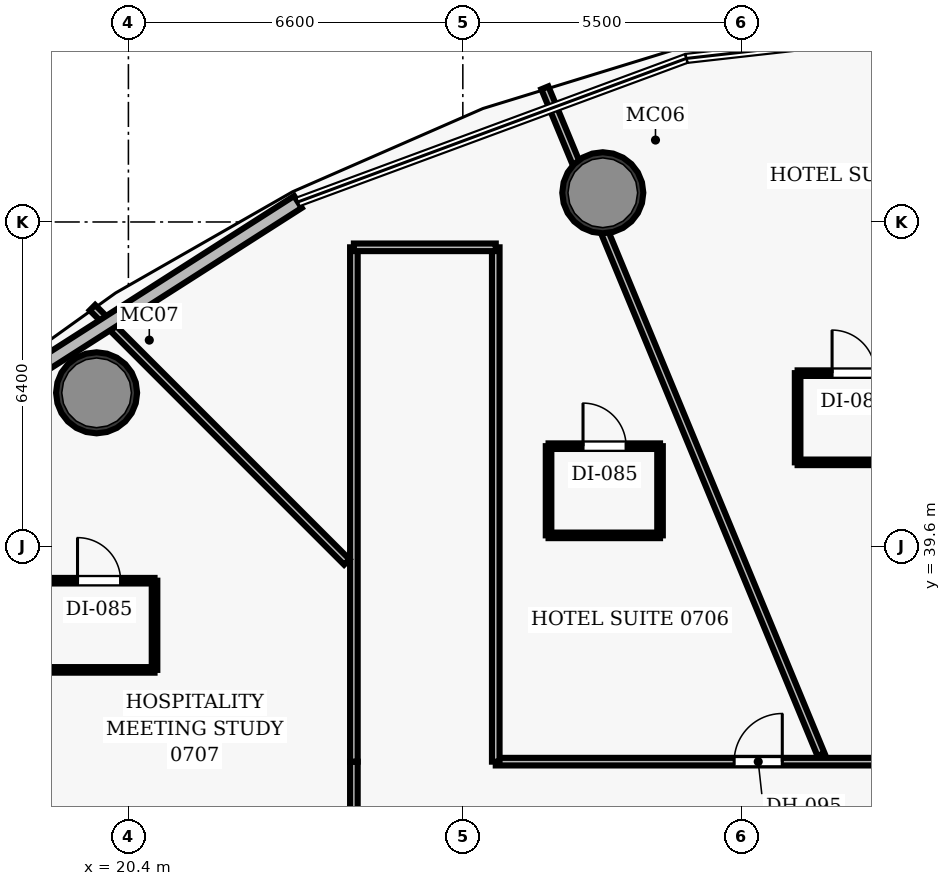
"""IFC4 building model, lengths in metres.
Left out: names, types, materials, properties, quantities, classifications, styles, units other than length and angle.
Written with IfcOpenShell. Run it as: python <this file> out.ifc"""

import sys

from ifc_helpers import new_model, si_unit, direction, frame, frame_2d, origin, origin_2d, place, context, subcontext, project, spatial, rectangle, hollow_circle, extrude, element, fill, save


model = new_model("IFC4")
c1 = context("Model", 3, precision=1e-05, world=origin(), true_north=direction((0.0, 1.0)))
c2 = subcontext(c1, "Body", "Model", "MODEL_VIEW")
j1 = project(units=[si_unit("LENGTHUNIT", "METRE"), si_unit("PLANEANGLEUNIT", "RADIAN")], contexts=[c1])
p1 = place(None, origin())
s1 = spatial("IfcSite", under=j1, at=p1, CompositionType="ELEMENT")
p2 = place(p1, origin())
s2 = spatial("IfcBuilding", under=s1, at=p2, CompositionType="ELEMENT")
p3 = place(p2, frame((0.0, 0.0, 41.4)))
s3 = spatial("IfcBuildingStorey", under=s2, at=p3, CompositionType="ELEMENT", Elevation=41.4)
for number, where, z_axis, x_axis in (
    (1, (29.762, 46.577, 0.0), (0.0, 0.0, 1.0), (1.0, 0.0, 0.0)),
    (2, (19.772, 42.629, 0.0), (0.0, 0.0, 1.0), (1.0, 0.0, 0.0)),
):
    element("IfcColumn", number, at=place(p3, frame(where, z_axis=z_axis, x_axis=x_axis)), inside=s3, PredefinedType="COLUMN", context=c2, shape_type="SweptSolid", body=[
        extrude(hollow_circle(Radius=0.8, WallThickness=0.06, at=origin_2d()), origin(), (0.0, 0.0, 1.0), 3.5),
    ])
p4 = place(p3, frame((27.65, 35.35, 0.0), z_axis=(0.0, 0.0, 1.0), x_axis=(1.0, 0.0, 0.0)))
e3 = element("IfcWall", 3, at=p4, inside=s3, PredefinedType="PARTITIONING", context=c2, shape_type="SweptSolid", body=[
    extrude(rectangle(XDim=23.5, YDim=0.15, at=frame_2d((11.75, 0.0))), origin(), (0.0, 0.0, 1.0), 2.6),
])
p5 = place(p4, frame((15.045, 0.0, 0.0)))
e4 = element("IfcOpeningElement", 4, at=p5, cuts=e3, PredefinedType="OPENING", context=c2, shape_type="SweptSolid", body=[
    extrude(rectangle(XDim=0.95, YDim=2.15, at=frame_2d((0.475, 1.075))), frame((0.0, 0.085, 0.0), z_axis=(0.0, -1.0, 0.0), x_axis=(1.0, 0.0, 0.0)), (0.0, 0.0, 1.0), 0.17),
])
p6 = place(p4, frame((11.159, 0.0, 0.0)))
e5 = element("IfcOpeningElement", 5, at=p6, cuts=e3, PredefinedType="OPENING", context=c2, shape_type="SweptSolid", body=[
    extrude(rectangle(XDim=0.95, YDim=2.15, at=frame_2d((0.475, 1.075))), frame((0.0, 0.085, 0.0), z_axis=(0.0, -1.0, 0.0), x_axis=(1.0, 0.0, 0.0)), (0.0, 0.0, 1.0), 0.17),
])
p7 = place(p4, frame((7.914, 0.0, 0.0)))
e6 = element("IfcOpeningElement", 6, at=p7, cuts=e3, PredefinedType="OPENING", context=c2, shape_type="SweptSolid", body=[
    extrude(rectangle(XDim=0.95, YDim=2.15, at=frame_2d((0.475, 1.075))), frame((0.0, 0.085, 0.0), z_axis=(0.0, -1.0, 0.0), x_axis=(1.0, 0.0, 0.0)), (0.0, 0.0, 1.0), 0.17),
])
p8 = place(p4, frame((4.705, 0.0, 0.0)))
e7 = element("IfcOpeningElement", 7, at=p8, cuts=e3, PredefinedType="OPENING", context=c2, shape_type="SweptSolid", body=[
    extrude(rectangle(XDim=0.95, YDim=2.15, at=frame_2d((0.475, 1.075))), frame((0.0, 0.085, 0.0), z_axis=(0.0, -1.0, 0.0), x_axis=(1.0, 0.0, 0.0)), (0.0, 0.0, 1.0), 0.17),
])
p9 = place(p3, frame((24.85, 19.45, 0.0), z_axis=(0.0, 0.0, 1.0), x_axis=(0.0, 1.0, 0.0)))
e8 = element("IfcWall", 8, at=p9, inside=s3, PredefinedType="PARTITIONING", context=c2, shape_type="SweptSolid", body=[
    extrude(rectangle(XDim=15.9, YDim=0.15, at=frame_2d((7.95, 0.0))), origin(), (0.0, 0.0, 1.0), 2.6),
])
p10 = place(p9, frame((12.728, 0.0, 0.0)))
e9 = element("IfcOpeningElement", 9, at=p10, cuts=e8, PredefinedType="OPENING", context=c2, shape_type="SweptSolid", body=[
    extrude(rectangle(XDim=0.95, YDim=2.15, at=frame_2d((0.475, 1.075))), frame((0.0, 0.085, 0.0), z_axis=(0.0, -1.0, 0.0), x_axis=(1.0, 0.0, 0.0)), (0.0, 0.0, 1.0), 0.17),
])
p11 = place(p9, frame((7.301, 0.0, 0.0)))
e10 = element("IfcOpeningElement", 10, at=p11, cuts=e8, PredefinedType="OPENING", context=c2, shape_type="SweptSolid", body=[
    extrude(rectangle(XDim=0.95, YDim=2.15, at=frame_2d((0.475, 1.075))), frame((0.0, 0.085, 0.0), z_axis=(0.0, -1.0, 0.0), x_axis=(1.0, 0.0, 0.0)), (0.0, 0.0, 1.0), 0.17),
])
p12 = place(p9, frame((4.849, 0.0, 0.0)))
e11 = element("IfcOpeningElement", 11, at=p12, cuts=e8, PredefinedType="OPENING", context=c2, shape_type="SweptSolid", body=[
    extrude(rectangle(XDim=0.95, YDim=2.15, at=frame_2d((0.475, 1.075))), frame((0.0, 0.085, 0.0), z_axis=(0.0, -1.0, 0.0), x_axis=(1.0, 0.0, 0.0)), (0.0, 0.0, 1.0), 0.17),
])
for number, where, z_axis, x_axis in (
    (12, (24.85, 35.35, 0.0), (0.0, 0.0, 1.0), (0.0, 1.0, 0.0)),
    (13, (27.65, 35.35, 0.0), (0.0, 0.0, 1.0), (0.0, 1.0, 0.0)),
):
    element("IfcWall", number, at=place(p3, frame(where, z_axis=z_axis, x_axis=x_axis)), inside=s3, PredefinedType="PARTITIONING", context=c2, shape_type="SweptSolid", body=[
        extrude(rectangle(XDim=10.15, YDim=0.15, at=frame_2d((5.075, 0.0))), origin(), (0.0, 0.0, 1.0), 2.6),
    ])
p13 = place(p3, frame((24.85, 45.5, 0.0), z_axis=(0.0, 0.0, 1.0), x_axis=(1.0, 0.0, 0.0)))
e14 = element("IfcWall", 14, at=p13, inside=s3, PredefinedType="PARTITIONING", context=c2, shape_type="SweptSolid", body=[
    extrude(rectangle(XDim=2.8, YDim=0.15, at=frame_2d((1.4, 0.0))), origin(), (0.0, 0.0, 1.0), 2.6),
])
p14 = place(p3, frame((34.069, 35.49, 0.0), z_axis=(0.0, 0.0, 1.0), x_axis=(-0.38268890868, 0.923877264128, 0.0)))
e15 = element("IfcWall", 15, at=p14, inside=s3, PredefinedType="PARTITIONING", context=c2, shape_type="SweptSolid", body=[
    extrude(rectangle(XDim=14.242, YDim=0.15, at=frame_2d((7.121, 0.0))), origin(), (0.0, 0.0, 1.0), 2.6),
])
p15 = place(p3, frame((24.71, 39.29, 0.0), z_axis=(0.0, 0.0, 1.0), x_axis=(-0.707106781187, 0.707106781187, 0.0)))
e16 = element("IfcWall", 16, at=p15, inside=s3, PredefinedType="PARTITIONING", context=c2, shape_type="SweptSolid", body=[
    extrude(rectangle(XDim=7.099, YDim=0.15, at=frame_2d((3.549, 0.0))), origin(), (0.0, 0.0, 1.0), 2.6),
])
p16 = place(p3, frame((24.71, 31.505, 0.0), z_axis=(0.0, 0.0, 1.0), x_axis=(-0.923878333013, 0.382686328197, 0.0)))
e17 = element("IfcWall", 17, at=p16, inside=s3, PredefinedType="PARTITIONING", context=c2, shape_type="SweptSolid", body=[
    extrude(rectangle(XDim=14.223, YDim=0.15, at=frame_2d((7.111, 0.0))), origin(), (0.0, 0.0, 1.0), 2.6),
])
p17 = place(p3, frame((33.607, 41.257, 0.0), z_axis=(0.0, 0.0, 1.0), x_axis=(1.0, 0.0, 0.0)))
e18 = element("IfcWall", 18, at=p17, inside=s3, PredefinedType="PARTITIONING", context=c2, shape_type="SweptSolid", body=[
    extrude(rectangle(XDim=2.2, YDim=0.11, at=frame_2d((1.1, 0.0))), origin(), (0.0, 0.0, 1.0), 2.6),
])
p18 = place(p3, frame((33.607, 43.017, 0.0), z_axis=(0.0, 0.0, 1.0), x_axis=(1.0, 0.0, 0.0)))
e19 = element("IfcWall", 19, at=p18, inside=s3, PredefinedType="PARTITIONING", context=c2, shape_type="SweptSolid", body=[
    extrude(rectangle(XDim=2.2, YDim=0.11, at=frame_2d((1.1, 0.0))), origin(), (0.0, 0.0, 1.0), 2.6),
])
p19 = place(p18, frame((0.68, 0.0, 0.0)))
e20 = element("IfcOpeningElement", 20, at=p19, cuts=e19, PredefinedType="OPENING", context=c2, shape_type="SweptSolid", body=[
    extrude(rectangle(XDim=0.85, YDim=2.1, at=frame_2d((0.425, 1.05))), frame((0.0, 0.065, 0.0), z_axis=(0.0, -1.0, 0.0), x_axis=(1.0, 0.0, 0.0)), (0.0, 0.0, 1.0), 0.13),
])
p20 = place(p3, frame((33.607, 41.257, 0.0), z_axis=(0.0, 0.0, 1.0), x_axis=(0.0, 1.0, 0.0)))
e21 = element("IfcWall", 21, at=p20, inside=s3, PredefinedType="PARTITIONING", context=c2, shape_type="SweptSolid", body=[
    extrude(rectangle(XDim=1.76, YDim=0.11, at=frame_2d((0.88, 0.0))), origin(), (0.0, 0.0, 1.0), 2.6),
])
p21 = place(p3, frame((28.692, 39.816, 0.0), z_axis=(0.0, 0.0, 1.0), x_axis=(1.0, 0.0, 0.0)))
e22 = element("IfcWall", 22, at=p21, inside=s3, PredefinedType="PARTITIONING", context=c2, shape_type="SweptSolid", body=[
    extrude(rectangle(XDim=2.2, YDim=0.11, at=frame_2d((1.1, 0.0))), origin(), (0.0, 0.0, 1.0), 2.6),
])
p22 = place(p3, frame((28.692, 41.576, 0.0), z_axis=(0.0, 0.0, 1.0), x_axis=(1.0, 0.0, 0.0)))
e23 = element("IfcWall", 23, at=p22, inside=s3, PredefinedType="PARTITIONING", context=c2, shape_type="SweptSolid", body=[
    extrude(rectangle(XDim=2.2, YDim=0.11, at=frame_2d((1.1, 0.0))), origin(), (0.0, 0.0, 1.0), 2.6),
])
p23 = place(p22, frame((0.68, 0.0, 0.0)))
e24 = element("IfcOpeningElement", 24, at=p23, cuts=e23, PredefinedType="OPENING", context=c2, shape_type="SweptSolid", body=[
    extrude(rectangle(XDim=0.85, YDim=2.1, at=frame_2d((0.425, 1.05))), frame((0.0, 0.065, 0.0), z_axis=(0.0, -1.0, 0.0), x_axis=(1.0, 0.0, 0.0)), (0.0, 0.0, 1.0), 0.13),
])
for number, where, z_axis, x_axis in (
    (25, (28.692, 39.816, 0.0), (0.0, 0.0, 1.0), (0.0, 1.0, 0.0)),
    (26, (30.892, 39.816, 0.0), (0.0, 0.0, 1.0), (0.0, 1.0, 0.0)),
):
    element("IfcWall", number, at=place(p3, frame(where, z_axis=z_axis, x_axis=x_axis)), inside=s3, PredefinedType="PARTITIONING", context=c2, shape_type="SweptSolid", body=[
        extrude(rectangle(XDim=1.76, YDim=0.11, at=frame_2d((0.88, 0.0))), origin(), (0.0, 0.0, 1.0), 2.6),
    ])
p24 = place(p3, frame((18.716, 37.161, 0.0), z_axis=(0.0, 0.0, 1.0), x_axis=(1.0, 0.0, 0.0)))
e27 = element("IfcWall", 27, at=p24, inside=s3, PredefinedType="PARTITIONING", context=c2, shape_type="SweptSolid", body=[
    extrude(rectangle(XDim=2.2, YDim=0.11, at=frame_2d((1.1, 0.0))), origin(), (0.0, 0.0, 1.0), 2.6),
])
p25 = place(p3, frame((18.716, 38.921, 0.0), z_axis=(0.0, 0.0, 1.0), x_axis=(1.0, 0.0, 0.0)))
e28 = element("IfcWall", 28, at=p25, inside=s3, PredefinedType="PARTITIONING", context=c2, shape_type="SweptSolid", body=[
    extrude(rectangle(XDim=2.2, YDim=0.11, at=frame_2d((1.1, 0.0))), origin(), (0.0, 0.0, 1.0), 2.6),
])
p26 = place(p25, frame((0.68, 0.0, 0.0)))
e29 = element("IfcOpeningElement", 29, at=p26, cuts=e28, PredefinedType="OPENING", context=c2, shape_type="SweptSolid", body=[
    extrude(rectangle(XDim=0.85, YDim=2.1, at=frame_2d((0.425, 1.05))), frame((0.0, 0.065, 0.0), z_axis=(0.0, -1.0, 0.0), x_axis=(1.0, 0.0, 0.0)), (0.0, 0.0, 1.0), 0.13),
])
p27 = place(p3, frame((20.916, 37.161, 0.0), z_axis=(0.0, 0.0, 1.0), x_axis=(0.0, 1.0, 0.0)))
e30 = element("IfcWall", 30, at=p27, inside=s3, PredefinedType="PARTITIONING", context=c2, shape_type="SweptSolid", body=[
    extrude(rectangle(XDim=1.76, YDim=0.11, at=frame_2d((0.88, 0.0))), origin(), (0.0, 0.0, 1.0), 2.6),
])
p28 = place(p3, frame((17.135, 42.173, 0.0), z_axis=(0.0, 0.0, 1.0), x_axis=(0.84275430181, 0.538298417962, 0.0)))
e31 = element("IfcWall", 31, at=p28, inside=s3, PredefinedType="SOLIDWALL", context=c2, shape_type="SweptSolid", body=[
    extrude(rectangle(XDim=7.845, YDim=0.28, at=frame_2d((3.922, 0.0))), origin(), (0.0, 0.0, 1.0), 3.25),
])
p29 = place(p19, origin())
e32 = element("IfcDoor", 32, at=p29, inside=s3, OperationType="SINGLE_SWING_LEFT", PredefinedType="DOOR", context=c2, shape_type="SweptSolid", body=[
    extrude(rectangle(XDim=0.85, YDim=2.1, at=frame_2d((0.425, 1.05))), frame((0.0, 0.025, 0.0), z_axis=(0.0, -1.0, 0.0), x_axis=(1.0, 0.0, 0.0)), (0.0, 0.0, 1.0), 0.05),
])
fill(e20, e32)
p30 = place(p8, origin())
e33 = element("IfcDoor", 33, at=p30, inside=s3, OperationType="SINGLE_SWING_RIGHT", PredefinedType="DOOR", context=c2, shape_type="SweptSolid", body=[
    extrude(rectangle(XDim=0.95, YDim=2.15, at=frame_2d((0.475, 1.075))), frame((0.0, 0.025, 0.0), z_axis=(0.0, -1.0, 0.0), x_axis=(1.0, 0.0, 0.0)), (0.0, 0.0, 1.0), 0.05),
])
fill(e7, e33)
p31 = place(p23, origin())
e34 = element("IfcDoor", 34, at=p31, inside=s3, OperationType="SINGLE_SWING_LEFT", PredefinedType="DOOR", context=c2, shape_type="SweptSolid", body=[
    extrude(rectangle(XDim=0.85, YDim=2.1, at=frame_2d((0.425, 1.05))), frame((0.0, 0.025, 0.0), z_axis=(0.0, -1.0, 0.0), x_axis=(1.0, 0.0, 0.0)), (0.0, 0.0, 1.0), 0.05),
])
fill(e24, e34)
p32 = place(p26, origin())
e35 = element("IfcDoor", 35, at=p32, inside=s3, OperationType="SINGLE_SWING_LEFT", PredefinedType="DOOR", context=c2, shape_type="SweptSolid", body=[
    extrude(rectangle(XDim=0.85, YDim=2.1, at=frame_2d((0.425, 1.05))), frame((0.0, 0.025, 0.0), z_axis=(0.0, -1.0, 0.0), x_axis=(1.0, 0.0, 0.0)), (0.0, 0.0, 1.0), 0.05),
])
fill(e29, e35)
save(model, sys.argv[1])
